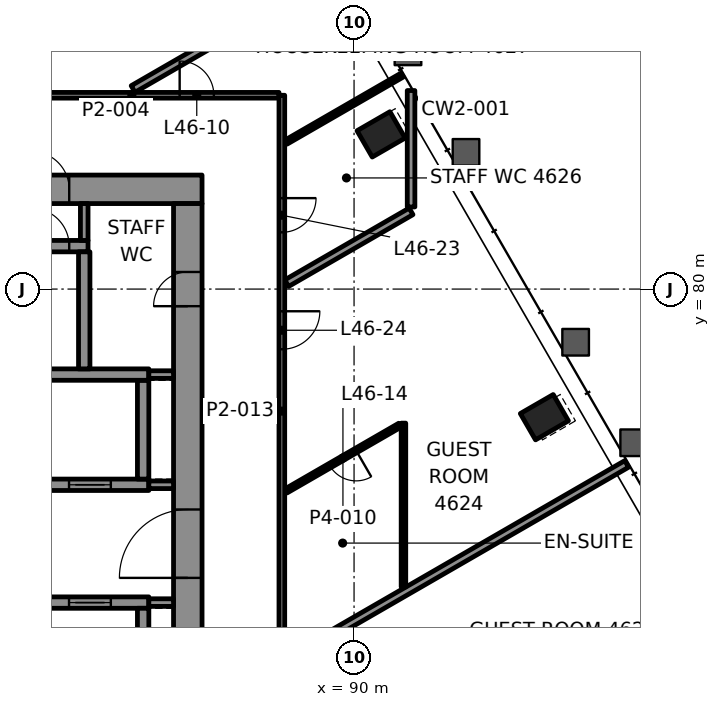
"""IFC4 building model, lengths in metres.
Left out: names, types, materials, properties, quantities, classifications, styles, units other than length and angle.
Written with IfcOpenShell. Run it as: python <this file> out.ifc"""

import sys

from ifc_helpers import new_model, si_unit, direction, frame, frame_2d, origin, origin_2d, place, context, subcontext, project, spatial, rectangle, hollow_rectangle, extrude, element, fill, save


model = new_model("IFC4")
c1 = context("Model", 3, precision=1e-05, world=origin(), true_north=direction((0.0, 1.0)))
c2 = subcontext(c1, "Body", "Model", "MODEL_VIEW")
j1 = project(units=[si_unit("LENGTHUNIT", "METRE"), si_unit("PLANEANGLEUNIT", "RADIAN")], contexts=[c1])
p1 = place(None, origin())
s1 = spatial("IfcSite", under=j1, at=p1, CompositionType="ELEMENT")
p2 = place(p1, origin())
s2 = spatial("IfcBuilding", under=s1, at=p2, CompositionType="ELEMENT")
p3 = place(p2, frame((0.0, 0.0, 198.7)))
s3 = spatial("IfcBuildingStorey", under=s2, at=p3, CompositionType="ELEMENT", Elevation=198.7)
for number, where, z_axis, x_axis in (
    (1, (95.008, 76.628, -0.0), (0.0, 0.0, 1.0), (-0.5, 0.866, 0.0)),
    (2, (90.711, 84.071, -0.0), (0.0, 0.0, 1.0), (-0.5, 0.866, 0.0)),
):
    element("IfcColumn", number, at=place(p3, frame(where, z_axis=z_axis, x_axis=x_axis)), inside=s3, PredefinedType="COLUMN", context=c2, shape_type="SweptSolid", body=[
        extrude(hollow_rectangle(XDim=0.8, YDim=1.0, WallThickness=0.05, at=origin_2d()), origin(), (0.0, 0.0, 1.0), 3.9),
    ])
p4 = place(p3, frame((64.0, 82.625, 0.0), z_axis=(0.0, 0.0, 1.0), x_axis=(1.0, 0.0, 0.0)))
e3 = element("IfcWall", 3, at=p4, inside=s3, PredefinedType="SHEAR", context=c2, shape_type="SweptSolid", body=[
    extrude(rectangle(XDim=22.0, YDim=0.75, at=frame_2d((11.0, 0.0))), origin(), (0.0, 0.0, 1.0), 3.7),
])
p5 = place(p4, frame((3.695, 0.0, 0.0)))
e4 = element("IfcOpeningElement", 4, at=p5, cuts=e3, PredefinedType="OPENING", context=c2, shape_type="SweptSolid", body=[
    extrude(rectangle(XDim=1.0, YDim=2.1, at=frame_2d((0.5, 1.05))), frame((0.0, 0.385, 0.0), z_axis=(0.0, -1.0, 0.0), x_axis=(1.0, 0.0, 0.0)), (0.0, 0.0, 1.0), 0.77),
])
p6 = place(p4, frame((17.505, 0.0, 0.0)))
e5 = element("IfcOpeningElement", 5, at=p6, cuts=e3, PredefinedType="OPENING", context=c2, shape_type="SweptSolid", body=[
    extrude(rectangle(XDim=1.0, YDim=2.1, at=frame_2d((0.5, 1.05))), frame((0.0, 0.385, 0.0), z_axis=(0.0, -1.0, 0.0), x_axis=(1.0, 0.0, 0.0)), (0.0, 0.0, 1.0), 0.77),
])
p7 = place(p4, frame((10.65, 0.0, 0.0)))
e6 = element("IfcOpeningElement", 6, at=p7, cuts=e3, PredefinedType="OPENING", context=c2, shape_type="SweptSolid", body=[
    extrude(rectangle(XDim=0.9, YDim=2.1, at=frame_2d((0.45, 1.05))), frame((0.0, 0.385, 0.0), z_axis=(0.0, -1.0, 0.0), x_axis=(1.0, 0.0, 0.0)), (0.0, 0.0, 1.0), 0.77),
])
p8 = place(p3, frame((85.625, 67.75, 0.0), z_axis=(0.0, 0.0, 1.0), x_axis=(0.0, 1.0, 0.0)))
e7 = element("IfcWall", 7, at=p8, inside=s3, PredefinedType="SHEAR", context=c2, shape_type="SweptSolid", body=[
    extrude(rectangle(XDim=14.5, YDim=0.75, at=frame_2d((7.25, 0.0))), origin(), (0.0, 0.0, 1.0), 3.7),
])
p9 = place(p8, frame((4.65, 0.0, 0.0)))
e8 = element("IfcOpeningElement", 8, at=p9, cuts=e7, PredefinedType="OPENING", context=c2, shape_type="SweptSolid", body=[
    extrude(rectangle(XDim=1.8, YDim=2.1, at=frame_2d((0.9, 1.05))), frame((0.0, 0.385, 0.0), z_axis=(0.0, -1.0, 0.0), x_axis=(1.0, 0.0, 0.0)), (0.0, 0.0, 1.0), 0.77),
])
p10 = place(p8, frame((11.8, 0.0, 0.0)))
e9 = element("IfcOpeningElement", 9, at=p10, cuts=e7, PredefinedType="OPENING", context=c2, shape_type="SweptSolid", body=[
    extrude(rectangle(XDim=0.9, YDim=2.1, at=frame_2d((0.45, 1.05))), frame((0.0, 0.385, 0.0), z_axis=(0.0, -1.0, 0.0), x_axis=(1.0, 0.0, 0.0)), (0.0, 0.0, 1.0), 0.77),
])
p11 = place(p3, frame((70.3, 71.75, 0.0), z_axis=(0.0, 0.0, 1.0), x_axis=(1.0, 0.0, 0.0)))
e10 = element("IfcWall", 10, at=p11, inside=s3, PredefinedType="SHEAR", context=c2, shape_type="SweptSolid", body=[
    extrude(rectangle(XDim=14.3, YDim=0.3, at=frame_2d((7.15, 0.0))), origin(), (0.0, 0.0, 1.0), 3.7),
])
p12 = place(p11, frame((1.0, 0.0, 0.0)))
e11 = element("IfcOpeningElement", 11, at=p12, cuts=e10, PredefinedType="OPENING", context=c2, shape_type="SweptSolid", body=[
    extrude(rectangle(XDim=1.1, YDim=2.1, at=frame_2d((0.55, 1.05))), frame((0.0, 0.16, 0.0), z_axis=(0.0, -1.0, 0.0), x_axis=(1.0, 0.0, 0.0)), (0.0, 0.0, 1.0), 0.32),
])
p13 = place(p11, frame((3.8, 0.0, 0.0)))
e12 = element("IfcOpeningElement", 12, at=p13, cuts=e10, PredefinedType="OPENING", context=c2, shape_type="SweptSolid", body=[
    extrude(rectangle(XDim=1.1, YDim=2.1, at=frame_2d((0.55, 1.05))), frame((0.0, 0.16, 0.0), z_axis=(0.0, -1.0, 0.0), x_axis=(1.0, 0.0, 0.0)), (0.0, 0.0, 1.0), 0.32),
])
p14 = place(p11, frame((6.6, 0.0, 0.0)))
e13 = element("IfcOpeningElement", 13, at=p14, cuts=e10, PredefinedType="OPENING", context=c2, shape_type="SweptSolid", body=[
    extrude(rectangle(XDim=1.1, YDim=2.1, at=frame_2d((0.55, 1.05))), frame((0.0, 0.16, 0.0), z_axis=(0.0, -1.0, 0.0), x_axis=(1.0, 0.0, 0.0)), (0.0, 0.0, 1.0), 0.32),
])
p15 = place(p11, frame((9.4, 0.0, 0.0)))
e14 = element("IfcOpeningElement", 14, at=p15, cuts=e10, PredefinedType="OPENING", context=c2, shape_type="SweptSolid", body=[
    extrude(rectangle(XDim=1.1, YDim=2.1, at=frame_2d((0.55, 1.05))), frame((0.0, 0.16, 0.0), z_axis=(0.0, -1.0, 0.0), x_axis=(1.0, 0.0, 0.0)), (0.0, 0.0, 1.0), 0.32),
])
p16 = place(p11, frame((12.2, 0.0, 0.0)))
e15 = element("IfcOpeningElement", 15, at=p16, cuts=e10, PredefinedType="OPENING", context=c2, shape_type="SweptSolid", body=[
    extrude(rectangle(XDim=1.1, YDim=2.1, at=frame_2d((0.55, 1.05))), frame((0.0, 0.16, 0.0), z_axis=(0.0, -1.0, 0.0), x_axis=(1.0, 0.0, 0.0)), (0.0, 0.0, 1.0), 0.32),
])
p17 = place(p3, frame((70.3, 74.85, 0.0), z_axis=(0.0, 0.0, 1.0), x_axis=(1.0, 0.0, 0.0)))
e16 = element("IfcWall", 16, at=p17, inside=s3, PredefinedType="SHEAR", context=c2, shape_type="SweptSolid", body=[
    extrude(rectangle(XDim=14.3, YDim=0.3, at=frame_2d((7.15, 0.0))), origin(), (0.0, 0.0, 1.0), 3.7),
])
p18 = place(p17, frame((3.8, 0.0, 0.0)))
e17 = element("IfcOpeningElement", 17, at=p18, cuts=e16, PredefinedType="OPENING", context=c2, shape_type="SweptSolid", body=[
    extrude(rectangle(XDim=1.1, YDim=2.1, at=frame_2d((0.55, 1.05))), frame((0.0, 0.16, 0.0), z_axis=(0.0, -1.0, 0.0), x_axis=(1.0, 0.0, 0.0)), (0.0, 0.0, 1.0), 0.32),
])
p19 = place(p17, frame((12.2, 0.0, 0.0)))
e18 = element("IfcOpeningElement", 18, at=p19, cuts=e16, PredefinedType="OPENING", context=c2, shape_type="SweptSolid", body=[
    extrude(rectangle(XDim=1.1, YDim=2.1, at=frame_2d((0.55, 1.05))), frame((0.0, 0.16, 0.0), z_axis=(0.0, -1.0, 0.0), x_axis=(1.0, 0.0, 0.0)), (0.0, 0.0, 1.0), 0.32),
])
for number, where, z_axis, x_axis in (
    (19, (84.45, 69.0, 0.0), (0.0, 0.0, 1.0), (0.0, 1.0, 0.0)),
    (20, (84.45, 75.0, 0.0), (0.0, 0.0, 1.0), (0.0, 1.0, 0.0)),
):
    element("IfcWall", number, at=place(p3, frame(where, z_axis=z_axis, x_axis=x_axis)), inside=s3, PredefinedType="SHEAR", context=c2, shape_type="SweptSolid", body=[
        extrude(rectangle(XDim=2.6, YDim=0.3, at=frame_2d((1.3, 0.0))), origin(), (0.0, 0.0, 1.0), 3.7),
    ])
p20 = place(p3, frame((67.15, 77.75, 0.0), z_axis=(0.0, 0.0, 1.0), x_axis=(1.0, 0.0, 0.0)))
e21 = element("IfcWall", 21, at=p20, inside=s3, PredefinedType="SHEAR", context=c2, shape_type="SweptSolid", body=[
    extrude(rectangle(XDim=17.45, YDim=0.3, at=frame_2d((8.725, 0.0))), origin(), (0.0, 0.0, 1.0), 3.7),
])
p21 = place(p20, frame((0.545, 0.0, 0.0)))
e22 = element("IfcOpeningElement", 22, at=p21, cuts=e21, PredefinedType="OPENING", context=c2, shape_type="SweptSolid", body=[
    extrude(rectangle(XDim=1.0, YDim=2.1, at=frame_2d((0.5, 1.05))), frame((0.0, 0.16, 0.0), z_axis=(0.0, -1.0, 0.0), x_axis=(1.0, 0.0, 0.0)), (0.0, 0.0, 1.0), 0.32),
])
p22 = place(p3, frame((76.14, 81.13, 0.0), z_axis=(0.0, 0.0, 1.0), x_axis=(1.0, 0.0, 0.0)))
e23 = element("IfcWall", 23, at=p22, inside=s3, PredefinedType="SHEAR", context=c2, shape_type="SweptSolid", body=[
    extrude(rectangle(XDim=6.86, YDim=0.3, at=frame_2d((3.43, 0.0))), origin(), (0.0, 0.0, 1.0), 3.7),
])
p23 = place(p22, frame((5.365, 0.0, 0.0)))
e24 = element("IfcOpeningElement", 24, at=p23, cuts=e23, PredefinedType="OPENING", context=c2, shape_type="SweptSolid", body=[
    extrude(rectangle(XDim=1.0, YDim=2.1, at=frame_2d((0.5, 1.05))), frame((0.0, 0.16, 0.0), z_axis=(0.0, -1.0, 0.0), x_axis=(1.0, 0.0, 0.0)), (0.0, 0.0, 1.0), 0.32),
])
p24 = place(p3, frame((82.9, 77.9, 0.0), z_axis=(0.0, 0.0, 1.0), x_axis=(0.0, 1.0, 0.0)))
e25 = element("IfcWall", 25, at=p24, inside=s3, PredefinedType="SHEAR", context=c2, shape_type="SweptSolid", body=[
    extrude(rectangle(XDim=3.08, YDim=0.3, at=frame_2d((1.54, 0.0))), origin(), (0.0, 0.0, 1.0), 3.7),
])
p25 = place(p3, frame((80.281, 85.1, 0.0), z_axis=(0.0, 0.0, 1.0), x_axis=(1.0, 0.0, 0.0)))
e26 = element("IfcWall", 26, at=p25, inside=s3, PredefinedType="PARTITIONING", context=c2, shape_type="SweptSolid", body=[
    extrude(rectangle(XDim=7.744, YDim=0.15, at=frame_2d((3.872, 0.0))), origin(), (0.0, 0.0, 1.0), 3.1),
])
p26 = place(p25, frame((5.13, 0.0, 0.0)))
e27 = element("IfcOpeningElement", 27, at=p26, cuts=e26, PredefinedType="OPENING", context=c2, shape_type="SweptSolid", body=[
    extrude(rectangle(XDim=0.9, YDim=2.1, at=frame_2d((0.45, 1.05))), frame((0.0, 0.085, 0.0), z_axis=(0.0, -1.0, 0.0), x_axis=(1.0, 0.0, 0.0)), (0.0, 0.0, 1.0), 0.17),
])
p27 = place(p3, frame((88.227, 70.233, 0.0), z_axis=(0.0, 0.0, 1.0), x_axis=(0.866025410072, 0.499999989109, 0.0)))
e28 = element("IfcWall", 28, at=p27, inside=s3, PredefinedType="PARTITIONING", context=c2, shape_type="SweptSolid", body=[
    extrude(rectangle(XDim=10.331, YDim=0.2, at=frame_2d((5.165, 0.0))), origin(), (0.0, 0.0, 1.0), 3.022),
])
p28 = place(p3, frame((91.205, 76.418, 0.0), z_axis=(0.0, 0.0, 1.0), x_axis=(-0.865997524453, -0.50004828531, 0.0)))
e29 = element("IfcWall", 29, at=p28, inside=s3, PredefinedType="PARTITIONING", context=c2, shape_type="SweptSolid", body=[
    extrude(rectangle(XDim=3.459, YDim=0.12, at=frame_2d((1.729, 0.0))), origin(), (0.0, 0.0, 1.0), 3.1),
])
p29 = place(p28, frame((1.33, 0.0, 0.0)))
e30 = element("IfcOpeningElement", 30, at=p29, cuts=e29, PredefinedType="OPENING", context=c2, shape_type="SweptSolid", body=[
    extrude(rectangle(XDim=0.8, YDim=2.1, at=frame_2d((0.4, 1.05))), frame((0.0, 0.07, 0.0), z_axis=(0.0, -1.0, 0.0), x_axis=(1.0, 0.0, 0.0)), (0.0, 0.0, 1.0), 0.14),
])
p30 = place(p3, frame((88.227, 80.155, 0.0), z_axis=(0.0, 0.0, 1.0), x_axis=(0.86599624775, 0.500050496333, 0.0)))
e31 = element("IfcWall", 31, at=p30, inside=s3, PredefinedType="PARTITIONING", context=c2, shape_type="SweptSolid", body=[
    extrude(rectangle(XDim=3.779, YDim=0.2, at=frame_2d((1.89, 0.0))), origin(), (0.0, 0.0, 1.0), 3.1),
])
p31 = place(p3, frame((88.21, 83.867, 0.0), z_axis=(0.0, 0.0, 1.0), x_axis=(0.866028878405, 0.499993981732, 0.0)))
e32 = element("IfcWall", 32, at=p31, inside=s3, PredefinedType="PARTITIONING", context=c2, shape_type="SweptSolid", body=[
    extrude(rectangle(XDim=3.528, YDim=0.12, at=frame_2d((1.764, 0.0))), origin(), (0.0, 0.0, 1.0), 3.022),
])
p32 = place(p3, frame((84.186, 85.265, 0.0), z_axis=(0.0, 0.0, 1.0), x_axis=(0.86601688729, 0.500014750711, 0.0)))
e33 = element("IfcWall", 33, at=p32, inside=s3, PredefinedType="PARTITIONING", context=c2, shape_type="SweptSolid", body=[
    extrude(rectangle(XDim=6.314, YDim=0.2, at=frame_2d((3.157, 0.0))), origin(), (0.0, 0.0, 1.0), 3.022),
])
p33 = place(p3, frame((91.5, 82.161, 0.0), z_axis=(0.0, 0.0, 1.0), x_axis=(0.0, 1.0, 0.0)))
e34 = element("IfcWall", 34, at=p33, inside=s3, PredefinedType="PARTITIONING", context=c2, shape_type="SweptSolid", body=[
    extrude(rectangle(XDim=3.064, YDim=0.2, at=frame_2d((1.532, 0.0))), origin(), (0.0, 0.0, 1.0), 3.022),
])
p34 = place(p3, frame((91.3, 72.162, 0.0), z_axis=(0.0, 0.0, 1.0), x_axis=(0.0, 1.0, 0.0)))
e35 = element("IfcWall", 35, at=p34, inside=s3, PredefinedType="PARTITIONING", context=c2, shape_type="SweptSolid", body=[
    extrude(rectangle(XDim=4.31, YDim=0.12, at=frame_2d((2.155, 0.0))), origin(), (0.0, 0.0, 1.0), 3.1),
])
p35 = place(p3, frame((88.1, 85.1, 0.0), z_axis=(0.0, 0.0, 1.0), x_axis=(0.0, -1.0, 0.0)))
e36 = element("IfcWall", 36, at=p35, inside=s3, PredefinedType="PARTITIONING", context=c2, shape_type="SweptSolid", body=[
    extrude(rectangle(XDim=16.624, YDim=0.15, at=frame_2d((8.312, 0.0))), origin(), (0.0, 0.0, 1.0), 3.1),
])
p36 = place(p35, frame((2.707, 0.0, 0.0)))
e37 = element("IfcOpeningElement", 37, at=p36, cuts=e36, PredefinedType="OPENING", context=c2, shape_type="SweptSolid", body=[
    extrude(rectangle(XDim=0.9, YDim=2.1, at=frame_2d((0.45, 1.05))), frame((0.0, 0.085, 0.0), z_axis=(0.0, -1.0, 0.0), x_axis=(1.0, 0.0, 0.0)), (0.0, 0.0, 1.0), 0.17),
])
p37 = place(p35, frame((5.684, 0.0, 0.0)))
e38 = element("IfcOpeningElement", 38, at=p37, cuts=e36, PredefinedType="OPENING", context=c2, shape_type="SweptSolid", body=[
    extrude(rectangle(XDim=1.0, YDim=2.1, at=frame_2d((0.5, 1.05))), frame((0.0, 0.085, 0.0), z_axis=(0.0, -1.0, 0.0), x_axis=(1.0, 0.0, 0.0)), (0.0, 0.0, 1.0), 0.17),
])
p38 = place(p35, frame((15.01, 0.0, 0.0)))
e39 = element("IfcOpeningElement", 39, at=p38, cuts=e36, PredefinedType="OPENING", context=c2, shape_type="SweptSolid", body=[
    extrude(rectangle(XDim=1.0, YDim=2.1, at=frame_2d((0.5, 1.05))), frame((0.0, 0.085, 0.0), z_axis=(0.0, -1.0, 0.0), x_axis=(1.0, 0.0, 0.0)), (0.0, 0.0, 1.0), 0.17),
])
for number, where, z_axis, x_axis in (
    (40, (84.6, 71.75, 0.0), (0.0, 0.0, 1.0), (1.0, 0.0, 0.0)),
    (41, (84.6, 74.85, 0.0), (0.0, 0.0, 1.0), (1.0, 0.0, 0.0)),
    (42, (84.6, 77.75, 0.0), (0.0, 0.0, 1.0), (1.0, 0.0, 0.0)),
):
    element("IfcWall", number, at=place(p3, frame(where, z_axis=z_axis, x_axis=x_axis)), inside=s3, PredefinedType="PARTITIONING", context=c2, shape_type="SweptSolid", body=[
        extrude(rectangle(XDim=0.65, YDim=0.2, at=frame_2d((0.325, 0.0))), origin(), (0.0, 0.0, 1.0), 3.7),
    ])
p39 = place(p3, frame((82.9, 81.28, 0.0), z_axis=(0.0, 0.0, 1.0), x_axis=(0.0, 1.0, 0.0)))
e43 = element("IfcWall", 43, at=p39, inside=s3, PredefinedType="PARTITIONING", context=c2, shape_type="SweptSolid", body=[
    extrude(rectangle(XDim=0.97, YDim=0.2, at=frame_2d((0.485, 0.0))), origin(), (0.0, 0.0, 1.0), 3.7),
])
p40 = place(p26, origin())
e44 = element("IfcDoor", 44, at=p40, inside=s3, OperationType="SINGLE_SWING_RIGHT", PredefinedType="DOOR", context=c2, shape_type="SweptSolid", body=[
    extrude(rectangle(XDim=0.9, YDim=2.1, at=frame_2d((0.45, 1.05))), frame((0.0, 0.025, 0.0), z_axis=(0.0, -1.0, 0.0), x_axis=(1.0, 0.0, 0.0)), (0.0, 0.0, 1.0), 0.05),
])
fill(e27, e44)
p41 = place(p29, origin())
e45 = element("IfcDoor", 45, at=p41, inside=s3, OperationType="SINGLE_SWING_LEFT", PredefinedType="DOOR", context=c2, shape_type="SweptSolid", body=[
    extrude(rectangle(XDim=0.8, YDim=2.1, at=frame_2d((0.4, 1.05))), frame((0.0, 0.025, 0.0), z_axis=(0.0, -1.0, 0.0), x_axis=(1.0, 0.0, 0.0)), (0.0, 0.0, 1.0), 0.05),
])
fill(e30, e45)
p42 = place(p36, origin())
e46 = element("IfcDoor", 46, at=p42, inside=s3, OperationType="SINGLE_SWING_RIGHT", PredefinedType="DOOR", context=c2, shape_type="SweptSolid", body=[
    extrude(rectangle(XDim=0.9, YDim=2.1, at=frame_2d((0.45, 1.05))), frame((0.0, 0.025, 0.0), z_axis=(0.0, -1.0, 0.0), x_axis=(1.0, 0.0, 0.0)), (0.0, 0.0, 1.0), 0.05),
])
fill(e37, e46)
p43 = place(p37, origin())
e47 = element("IfcDoor", 47, at=p43, inside=s3, OperationType="SINGLE_SWING_RIGHT", PredefinedType="DOOR", context=c2, shape_type="SweptSolid", body=[
    extrude(rectangle(XDim=1.0, YDim=2.1, at=frame_2d((0.5, 1.05))), frame((0.0, 0.025, 0.0), z_axis=(0.0, -1.0, 0.0), x_axis=(1.0, 0.0, 0.0)), (0.0, 0.0, 1.0), 0.05),
])
fill(e38, e47)
p44 = place(p16, origin())
e48 = element("IfcDoor", 48, at=p44, inside=s3, OperationType="DOUBLE_DOOR_SLIDING", PredefinedType="DOOR", context=c2, shape_type="SweptSolid", body=[
    extrude(rectangle(XDim=1.1, YDim=2.1, at=frame_2d((0.55, 1.05))), frame((0.0, 0.025, 0.0), z_axis=(0.0, -1.0, 0.0), x_axis=(1.0, 0.0, 0.0)), (0.0, 0.0, 1.0), 0.05),
])
fill(e15, e48)
p45 = place(p19, origin())
e49 = element("IfcDoor", 49, at=p45, inside=s3, OperationType="DOUBLE_DOOR_SLIDING", PredefinedType="DOOR", context=c2, shape_type="SweptSolid", body=[
    extrude(rectangle(XDim=1.1, YDim=2.1, at=frame_2d((0.55, 1.05))), frame((0.0, 0.025, 0.0), z_axis=(0.0, -1.0, 0.0), x_axis=(1.0, 0.0, 0.0)), (0.0, 0.0, 1.0), 0.05),
])
fill(e18, e49)
p46 = place(p23, origin())
e50 = element("IfcDoor", 50, at=p46, inside=s3, OperationType="SINGLE_SWING_RIGHT", PredefinedType="DOOR", context=c2, shape_type="SweptSolid", body=[
    extrude(rectangle(XDim=1.0, YDim=2.1, at=frame_2d((0.5, 1.05))), frame((0.0, 0.025, 0.0), z_axis=(0.0, -1.0, 0.0), x_axis=(1.0, 0.0, 0.0)), (0.0, 0.0, 1.0), 0.05),
])
fill(e24, e50)
p47 = place(p6, origin())
e51 = element("IfcDoor", 51, at=p47, inside=s3, OperationType="SINGLE_SWING_LEFT", PredefinedType="DOOR", context=c2, shape_type="SweptSolid", body=[
    extrude(rectangle(XDim=1.0, YDim=2.1, at=frame_2d((0.5, 1.05))), frame((0.0, 0.095, 0.0), z_axis=(0.0, -1.0, 0.0), x_axis=(1.0, 0.0, 0.0)), (0.0, 0.0, 1.0), 0.19),
])
fill(e5, e51)
p48 = place(p9, origin())
e52 = element("IfcDoor", 52, at=p48, inside=s3, OperationType="SINGLE_SWING_RIGHT", PredefinedType="DOOR", context=c2, shape_type="SweptSolid", body=[
    extrude(rectangle(XDim=1.8, YDim=2.1, at=frame_2d((0.9, 1.05))), frame((0.0, 0.095, 0.0), z_axis=(0.0, -1.0, 0.0), x_axis=(1.0, 0.0, 0.0)), (0.0, 0.0, 1.0), 0.19),
])
fill(e8, e52)
p49 = place(p10, origin())
e53 = element("IfcDoor", 53, at=p49, inside=s3, OperationType="SINGLE_SWING_LEFT", PredefinedType="DOOR", context=c2, shape_type="SweptSolid", body=[
    extrude(rectangle(XDim=0.9, YDim=2.1, at=frame_2d((0.45, 1.05))), frame((0.0, 0.095, 0.0), z_axis=(0.0, -1.0, 0.0), x_axis=(1.0, 0.0, 0.0)), (0.0, 0.0, 1.0), 0.19),
])
fill(e9, e53)
save(model, sys.argv[1])
